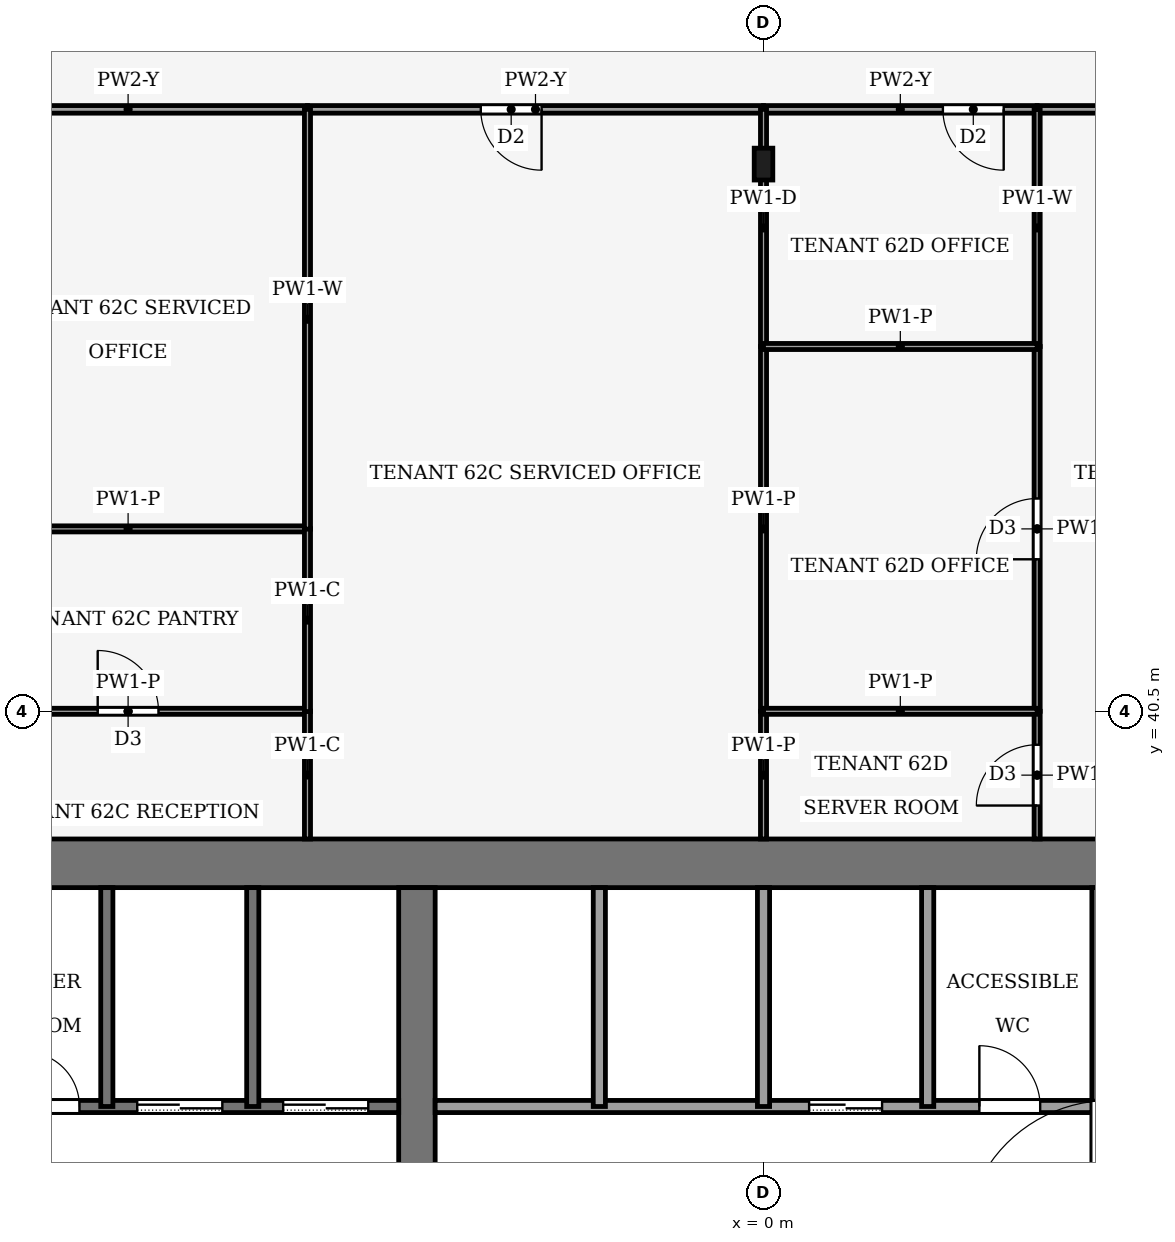
"""IFC4 building model, lengths in metres.
Left out: names, types, materials, properties, quantities, classifications, styles, units other than length and angle.
Written with IfcOpenShell. Run it as: python <this file> out.ifc"""

import sys

from ifc_helpers import new_model, si_unit, direction, frame, frame_2d, origin, origin_2d, place, context, subcontext, project, spatial, rectangle, i_section, extrude, element, fill, save


model = new_model("IFC4")
c1 = context("Model", 3, precision=1e-05, world=origin(), true_north=direction((0.0, 1.0)))
c2 = subcontext(c1, "Body", "Model", "MODEL_VIEW")
j1 = project(units=[si_unit("LENGTHUNIT", "METRE"), si_unit("PLANEANGLEUNIT", "RADIAN")], contexts=[c1])
p1 = place(None, origin())
s1 = spatial("IfcSite", under=j1, at=p1, CompositionType="ELEMENT")
p2 = place(p1, origin())
s2 = spatial("IfcBuilding", under=s1, at=p2, CompositionType="ELEMENT")
p3 = place(p2, frame((0.0, 0.0, 270.0)))
s3 = spatial("IfcBuildingStorey", under=s2, at=p3, CompositionType="ELEMENT", Elevation=270.0)
p4 = place(p3, frame((-13.4, 38.0, -0.13), z_axis=(0.0, 0.0, 1.0), x_axis=(1.0, 0.0, 0.0)))
e1 = element("IfcWall", 1, at=p4, inside=s3, PredefinedType="SHEAR", context=c2, shape_type="SweptSolid", body=[
    extrude(rectangle(XDim=26.8, YDim=0.8, at=frame_2d((13.4, 0.0))), origin(), (0.0, 0.0, 1.0), 4.0),
])
p5 = place(p3, frame((-5.7, 18.4, -0.13), z_axis=(0.0, 0.0, 1.0), x_axis=(0.0, 1.0, 0.0)))
e2 = element("IfcWall", 2, at=p5, inside=s3, PredefinedType="SHEAR", context=c2, shape_type="SweptSolid", body=[
    extrude(rectangle(XDim=19.2, YDim=0.6, at=frame_2d((9.6, 0.0))), origin(), (0.0, 0.0, 1.0), 4.0),
])
p6 = place(p5, frame((8.35, 0.0, 0.13)))
e3 = element("IfcOpeningElement", 3, at=p6, cuts=e2, PredefinedType="OPENING", context=c2, shape_type="SweptSolid", body=[
    extrude(rectangle(XDim=0.9, YDim=2.1, at=frame_2d((0.45, 1.05))), frame((0.0, 0.31, 0.0), z_axis=(0.0, -1.0, 0.0), x_axis=(1.0, 0.0, 0.0)), (0.0, 0.0, 1.0), 0.62),
])
p7 = place(p3, frame((5.7, 18.4, -0.13), z_axis=(0.0, 0.0, 1.0), x_axis=(0.0, 1.0, 0.0)))
e4 = element("IfcWall", 4, at=p7, inside=s3, PredefinedType="SHEAR", context=c2, shape_type="SweptSolid", body=[
    extrude(rectangle(XDim=19.2, YDim=0.6, at=frame_2d((9.6, 0.0))), origin(), (0.0, 0.0, 1.0), 4.0),
])
p8 = place(p7, frame((13.3, 0.0, 0.13)))
e5 = element("IfcOpeningElement", 5, at=p8, cuts=e4, PredefinedType="OPENING", context=c2, shape_type="SweptSolid", body=[
    extrude(rectangle(XDim=2.4, YDim=2.4, at=frame_2d((1.2, 1.2))), frame((0.0, 0.31, 0.0), z_axis=(0.0, -1.0, 0.0), x_axis=(1.0, 0.0, 0.0)), (0.0, 0.0, 1.0), 0.62),
])
p9 = place(p3, frame((0.0, 49.5, 0.0), z_axis=(0.0, 0.0, 1.0), x_axis=(1.0, 0.0, 0.0)))
e6 = element("IfcColumn", 6, at=p9, inside=s3, PredefinedType="COLUMN", context=c2, shape_type="SweptSolid", body=[
    extrude(i_section(OverallWidth=0.306, OverallDepth=0.524, WebThickness=0.012, FlangeThickness=0.04, FilletRadius=0.027, at=origin_2d()), origin(), (0.0, 0.0, 1.0), 4.0),
])
p10 = place(p3, frame((-12.6, 34.0, 0.0), z_axis=(0.0, 0.0, 1.0), x_axis=(1.0, 0.0, 0.0)))
e7 = element("IfcWall", 7, at=p10, inside=s3, PredefinedType="PARTITIONING", context=c2, shape_type="SweptSolid", body=[
    extrude(rectangle(XDim=6.6, YDim=0.2, at=frame_2d((3.3, 0.0))), origin(), (0.0, 0.0, 1.0), 3.87),
])
p11 = place(p10, frame((4.7, 0.0, 0.0)))
e8 = element("IfcOpeningElement", 8, at=p11, cuts=e7, PredefinedType="OPENING", context=c2, shape_type="SweptSolid", body=[
    extrude(rectangle(XDim=1.4, YDim=2.2, at=frame_2d((0.7, 1.1))), frame((0.0, 0.11, 0.0), z_axis=(0.0, -1.0, 0.0), x_axis=(1.0, 0.0, 0.0)), (0.0, 0.0, 1.0), 0.22),
])
p12 = place(p10, frame((2.3, 0.0, 0.0)))
e9 = element("IfcOpeningElement", 9, at=p12, cuts=e7, PredefinedType="OPENING", context=c2, shape_type="SweptSolid", body=[
    extrude(rectangle(XDim=1.4, YDim=2.2, at=frame_2d((0.7, 1.1))), frame((0.0, 0.11, 0.0), z_axis=(0.0, -1.0, 0.0), x_axis=(1.0, 0.0, 0.0)), (0.0, 0.0, 1.0), 0.22),
])
p13 = place(p10, frame((0.45, 0.0, 0.0)))
e10 = element("IfcOpeningElement", 10, at=p13, cuts=e7, PredefinedType="OPENING", context=c2, shape_type="SweptSolid", body=[
    extrude(rectangle(XDim=0.9, YDim=2.1, at=frame_2d((0.45, 1.05))), frame((0.0, 0.11, 0.0), z_axis=(0.0, -1.0, 0.0), x_axis=(1.0, 0.0, 0.0)), (0.0, 0.0, 1.0), 0.22),
])
p14 = place(p3, frame((-5.4, 34.0, 0.0), z_axis=(0.0, 0.0, 1.0), x_axis=(1.0, 0.0, 0.0)))
e11 = element("IfcWall", 11, at=p14, inside=s3, PredefinedType="PARTITIONING", context=c2, shape_type="SweptSolid", body=[
    extrude(rectangle(XDim=10.8, YDim=0.2, at=frame_2d((5.4, 0.0))), origin(), (0.0, 0.0, 1.0), 3.87),
])
p15 = place(p14, frame((6.15, 0.0, 0.0)))
e12 = element("IfcOpeningElement", 12, at=p15, cuts=e11, PredefinedType="OPENING", context=c2, shape_type="SweptSolid", body=[
    extrude(rectangle(XDim=1.2, YDim=2.2, at=frame_2d((0.6, 1.1))), frame((0.0, 0.11, 0.0), z_axis=(0.0, -1.0, 0.0), x_axis=(1.0, 0.0, 0.0)), (0.0, 0.0, 1.0), 0.22),
])
p16 = place(p14, frame((8.95, 0.0, 0.0)))
e13 = element("IfcOpeningElement", 13, at=p16, cuts=e11, PredefinedType="OPENING", context=c2, shape_type="SweptSolid", body=[
    extrude(rectangle(XDim=1.0, YDim=2.1, at=frame_2d((0.5, 1.05))), frame((0.0, 0.11, 0.0), z_axis=(0.0, -1.0, 0.0), x_axis=(1.0, 0.0, 0.0)), (0.0, 0.0, 1.0), 0.22),
])
for number, where, z_axis, x_axis in (
    (14, (-10.8, 34.0, 0.0), (0.0, 0.0, 1.0), (0.0, 1.0, 0.0)),
    (15, (-8.4, 34.0, 0.0), (0.0, 0.0, 1.0), (0.0, 1.0, 0.0)),
    (16, (-2.7, 34.0, 0.0), (0.0, 0.0, 1.0), (0.0, 1.0, 0.0)),
    (17, (0.0, 34.0, 0.0), (0.0, 0.0, 1.0), (0.0, 1.0, 0.0)),
    (18, (2.7, 34.0, 0.0), (0.0, 0.0, 1.0), (0.0, 1.0, 0.0)),
):
    element("IfcWall", number, at=place(p3, frame(where, z_axis=z_axis, x_axis=x_axis)), inside=s3, PredefinedType="PARTITIONING", context=c2, shape_type="SweptSolid", body=[
        extrude(rectangle(XDim=3.6, YDim=0.2, at=frame_2d((1.8, 0.0))), origin(), (0.0, 0.0, 1.0), 3.87),
    ])
p17 = place(p3, frame((-7.5, 50.4, 0.0), z_axis=(0.0, 0.0, 1.0), x_axis=(-1.0, 0.0, 0.0)))
e19 = element("IfcWall", 19, at=p17, inside=s3, PredefinedType="PARTITIONING", context=c2, shape_type="SweptSolid", body=[
    extrude(rectangle(XDim=5.9, YDim=0.125, at=frame_2d((2.95, 0.0))), origin(), (0.0, 0.0, 1.0), 3.24),
])
p18 = place(p3, frame((0.0, 50.4, 0.0), z_axis=(0.0, 0.0, 1.0), x_axis=(-1.0, 0.0, 0.0)))
e20 = element("IfcWall", 20, at=p18, inside=s3, PredefinedType="PARTITIONING", context=c2, shape_type="SweptSolid", body=[
    extrude(rectangle(XDim=7.5, YDim=0.125, at=frame_2d((3.75, 0.0))), origin(), (0.0, 0.0, 1.0), 3.24),
])
p19 = place(p18, frame((3.65, 0.0, 0.0)))
e21 = element("IfcOpeningElement", 21, at=p19, cuts=e20, PredefinedType="OPENING", context=c2, shape_type="SweptSolid", body=[
    extrude(rectangle(XDim=1.0, YDim=2.1, at=frame_2d((0.5, 1.05))), frame((0.0, 0.073, 0.0), z_axis=(0.0, -1.0, 0.0), x_axis=(1.0, 0.0, 0.0)), (0.0, 0.0, 1.0), 0.145),
])
p20 = place(p3, frame((10.4, 50.4, 0.0), z_axis=(0.0, 0.0, 1.0), x_axis=(-1.0, 0.0, 0.0)))
e22 = element("IfcWall", 22, at=p20, inside=s3, PredefinedType="PARTITIONING", context=c2, shape_type="SweptSolid", body=[
    extrude(rectangle(XDim=5.9, YDim=0.125, at=frame_2d((2.95, 0.0))), origin(), (0.0, 0.0, 1.0), 3.24),
])
p21 = place(p20, frame((2.45, 0.0, 0.0)))
e23 = element("IfcOpeningElement", 23, at=p21, cuts=e22, PredefinedType="OPENING", context=c2, shape_type="SweptSolid", body=[
    extrude(rectangle(XDim=1.0, YDim=2.1, at=frame_2d((0.5, 1.05))), frame((0.0, 0.073, 0.0), z_axis=(0.0, -1.0, 0.0), x_axis=(1.0, 0.0, 0.0)), (0.0, 0.0, 1.0), 0.145),
])
p22 = place(p3, frame((4.5, 50.4, 0.0), z_axis=(0.0, 0.0, 1.0), x_axis=(-1.0, 0.0, 0.0)))
e24 = element("IfcWall", 24, at=p22, inside=s3, PredefinedType="PARTITIONING", context=c2, shape_type="SweptSolid", body=[
    extrude(rectangle(XDim=4.5, YDim=0.125, at=frame_2d((2.25, 0.0))), origin(), (0.0, 0.0, 1.0), 3.24),
])
p23 = place(p22, frame((0.55, 0.0, 0.0)))
e25 = element("IfcOpeningElement", 25, at=p23, cuts=e24, PredefinedType="OPENING", context=c2, shape_type="SweptSolid", body=[
    extrude(rectangle(XDim=1.0, YDim=2.1, at=frame_2d((0.5, 1.05))), frame((0.0, 0.073, 0.0), z_axis=(0.0, -1.0, 0.0), x_axis=(1.0, 0.0, 0.0)), (0.0, 0.0, 1.0), 0.145),
])
p24 = place(p3, frame((-13.4, 40.5, 0.0), z_axis=(0.0, 0.0, 1.0), x_axis=(1.0, 0.0, 0.0)))
e26 = element("IfcWall", 26, at=p24, inside=s3, PredefinedType="PARTITIONING", context=c2, shape_type="SweptSolid", body=[
    extrude(rectangle(XDim=5.9, YDim=0.1, at=frame_2d((2.95, 0.0))), origin(), (0.0, 0.0, 1.0), 3.44),
])
p25 = place(p24, frame((2.45, 0.0, 0.0)))
e27 = element("IfcOpeningElement", 27, at=p25, cuts=e26, PredefinedType="OPENING", context=c2, shape_type="SweptSolid", body=[
    extrude(rectangle(XDim=1.0, YDim=2.1, at=frame_2d((0.5, 1.05))), frame((0.0, 0.06, 0.0), z_axis=(0.0, -1.0, 0.0), x_axis=(1.0, 0.0, 0.0)), (0.0, 0.0, 1.0), 0.12),
])
p26 = place(p3, frame((-7.5, 38.4, 0.0), z_axis=(0.0, 0.0, 1.0), x_axis=(0.0, 1.0, 0.0)))
e28 = element("IfcWall", 28, at=p26, inside=s3, PredefinedType="PARTITIONING", context=c2, shape_type="SweptSolid", body=[
    extrude(rectangle(XDim=2.104, YDim=0.1, at=frame_2d((1.052, 0.0))), origin(), (0.0, 0.0, 1.0), 3.87),
])
p27 = place(p3, frame((-7.5, 43.5, 0.0), z_axis=(0.0, 0.0, 1.0), x_axis=(-1.0, 0.0, 0.0)))
e29 = element("IfcWall", 29, at=p27, inside=s3, PredefinedType="PARTITIONING", context=c2, shape_type="SweptSolid", body=[
    extrude(rectangle(XDim=5.9, YDim=0.1, at=frame_2d((2.95, 0.0))), origin(), (0.0, 0.0, 1.0), 3.44),
])
p28 = place(p3, frame((-7.5, 40.496, 0.0), z_axis=(0.0, 0.0, 1.0), x_axis=(0.0, 1.0, 0.0)))
e30 = element("IfcWall", 30, at=p28, inside=s3, PredefinedType="PARTITIONING", context=c2, shape_type="SweptSolid", body=[
    extrude(rectangle(XDim=3.008, YDim=0.1, at=frame_2d((1.504, 0.0))), origin(), (0.0, 0.0, 1.0), 3.87),
])
p29 = place(p3, frame((-7.5, 43.496, 0.0), z_axis=(0.0, 0.0, 1.0), x_axis=(0.0, 1.0, 0.0)))
e31 = element("IfcWall", 31, at=p29, inside=s3, PredefinedType="PARTITIONING", context=c2, shape_type="SweptSolid", body=[
    extrude(rectangle(XDim=6.904, YDim=0.1, at=frame_2d((3.452, 0.0))), origin(), (0.0, 0.0, 1.0), 3.24),
])
p30 = place(p3, frame((0.0, 38.4, 0.0), z_axis=(0.0, 0.0, 1.0), x_axis=(0.0, 1.0, 0.0)))
e32 = element("IfcWall", 32, at=p30, inside=s3, PredefinedType="PARTITIONING", context=c2, shape_type="SweptSolid", body=[
    extrude(rectangle(XDim=2.1, YDim=0.1, at=frame_2d((1.05, 0.0))), origin(), (0.0, 0.0, 1.0), 3.44),
])
p31 = place(p3, frame((0.0, 40.5, 0.0), z_axis=(0.0, 0.0, 1.0), x_axis=(0.0, 1.0, 0.0)))
e33 = element("IfcWall", 33, at=p31, inside=s3, PredefinedType="PARTITIONING", context=c2, shape_type="SweptSolid", body=[
    extrude(rectangle(XDim=6.0, YDim=0.1, at=frame_2d((3.0, 0.0))), origin(), (0.0, 0.0, 1.0), 3.44),
])
p32 = place(p3, frame((0.0, 46.5, 0.0), z_axis=(0.0, 0.0, 1.0), x_axis=(0.0, 1.0, 0.0)))
e34 = element("IfcWall", 34, at=p32, inside=s3, PredefinedType="PARTITIONING", context=c2, shape_type="SweptSolid", body=[
    extrude(rectangle(XDim=3.9, YDim=0.1, at=frame_2d((1.95, 0.0))), origin(), (0.0, 0.0, 1.0), 3.29),
])
p33 = place(p3, frame((4.5, 38.4, 0.0), z_axis=(0.0, 0.0, 1.0), x_axis=(0.0, 1.0, 0.0)))
e35 = element("IfcWall", 35, at=p33, inside=s3, PredefinedType="PARTITIONING", context=c2, shape_type="SweptSolid", body=[
    extrude(rectangle(XDim=2.1, YDim=0.1, at=frame_2d((1.05, 0.0))), origin(), (0.0, 0.0, 1.0), 3.87),
])
p34 = place(p33, frame((0.55, 0.0, 0.0)))
e36 = element("IfcOpeningElement", 36, at=p34, cuts=e35, PredefinedType="OPENING", context=c2, shape_type="SweptSolid", body=[
    extrude(rectangle(XDim=1.0, YDim=2.1, at=frame_2d((0.5, 1.05))), frame((0.0, 0.06, 0.0), z_axis=(0.0, -1.0, 0.0), x_axis=(1.0, 0.0, 0.0)), (0.0, 0.0, 1.0), 0.12),
])
p35 = place(p3, frame((4.5, 40.5, 0.0), z_axis=(0.0, 0.0, 1.0), x_axis=(0.0, 1.0, 0.0)))
e37 = element("IfcWall", 37, at=p35, inside=s3, PredefinedType="PARTITIONING", context=c2, shape_type="SweptSolid", body=[
    extrude(rectangle(XDim=6.0, YDim=0.1, at=frame_2d((3.0, 0.0))), origin(), (0.0, 0.0, 1.0), 3.87),
])
p36 = place(p35, frame((2.5, 0.0, 0.0)))
e38 = element("IfcOpeningElement", 38, at=p36, cuts=e37, PredefinedType="OPENING", context=c2, shape_type="SweptSolid", body=[
    extrude(rectangle(XDim=1.0, YDim=2.1, at=frame_2d((0.5, 1.05))), frame((0.0, 0.06, 0.0), z_axis=(0.0, -1.0, 0.0), x_axis=(1.0, 0.0, 0.0)), (0.0, 0.0, 1.0), 0.12),
])
p37 = place(p3, frame((4.5, 50.4, 0.0), z_axis=(0.0, 0.0, 1.0), x_axis=(0.0, -1.0, 0.0)))
e39 = element("IfcWall", 39, at=p37, inside=s3, PredefinedType="PARTITIONING", context=c2, shape_type="SweptSolid", body=[
    extrude(rectangle(XDim=3.9, YDim=0.1, at=frame_2d((1.95, 0.0))), origin(), (0.0, 0.0, 1.0), 3.24),
])
for number, where, z_axis, x_axis in (
    (40, (4.5, 40.5, 0.0), (0.0, 0.0, 1.0), (-1.0, 0.0, 0.0)),
    (41, (4.5, 46.5, 0.0), (0.0, 0.0, 1.0), (-1.0, 0.0, 0.0)),
):
    element("IfcWall", number, at=place(p3, frame(where, z_axis=z_axis, x_axis=x_axis)), inside=s3, PredefinedType="PARTITIONING", context=c2, shape_type="SweptSolid", body=[
        extrude(rectangle(XDim=4.5, YDim=0.1, at=frame_2d((2.25, 0.0))), origin(), (0.0, 0.0, 1.0), 3.44),
    ])
p38 = place(p15, origin())
e42 = element("IfcDoor", 42, at=p38, inside=s3, OperationType="SLIDING_TO_LEFT", PredefinedType="DOOR", context=c2, shape_type="SweptSolid", body=[
    extrude(rectangle(XDim=1.2, YDim=2.2, at=frame_2d((0.6, 1.1))), frame((0.0, 0.025, 0.0), z_axis=(0.0, -1.0, 0.0), x_axis=(1.0, 0.0, 0.0)), (0.0, 0.0, 1.0), 0.05),
])
fill(e12, e42)
p39 = place(p11, origin())
e43 = element("IfcDoor", 43, at=p39, inside=s3, OperationType="SLIDING_TO_LEFT", PredefinedType="DOOR", context=c2, shape_type="SweptSolid", body=[
    extrude(rectangle(XDim=1.4, YDim=2.2, at=frame_2d((0.7, 1.1))), frame((0.0, 0.025, 0.0), z_axis=(0.0, -1.0, 0.0), x_axis=(1.0, 0.0, 0.0)), (0.0, 0.0, 1.0), 0.05),
])
fill(e8, e43)
p40 = place(p12, origin())
e44 = element("IfcDoor", 44, at=p40, inside=s3, OperationType="SLIDING_TO_LEFT", PredefinedType="DOOR", context=c2, shape_type="SweptSolid", body=[
    extrude(rectangle(XDim=1.4, YDim=2.2, at=frame_2d((0.7, 1.1))), frame((0.0, 0.025, 0.0), z_axis=(0.0, -1.0, 0.0), x_axis=(1.0, 0.0, 0.0)), (0.0, 0.0, 1.0), 0.05),
])
fill(e9, e44)
p41 = place(p13, origin())
e45 = element("IfcDoor", 45, at=p41, inside=s3, OperationType="SINGLE_SWING_RIGHT", PredefinedType="DOOR", context=c2, shape_type="SweptSolid", body=[
    extrude(rectangle(XDim=0.9, YDim=2.1, at=frame_2d((0.45, 1.05))), frame((0.0, 0.025, 0.0), z_axis=(0.0, -1.0, 0.0), x_axis=(1.0, 0.0, 0.0)), (0.0, 0.0, 1.0), 0.05),
])
fill(e10, e45)
p42 = place(p16, origin())
e46 = element("IfcDoor", 46, at=p42, inside=s3, OperationType="SINGLE_SWING_LEFT", PredefinedType="DOOR", context=c2, shape_type="SweptSolid", body=[
    extrude(rectangle(XDim=1.0, YDim=2.1, at=frame_2d((0.5, 1.05))), frame((0.0, 0.025, 0.0), z_axis=(0.0, -1.0, 0.0), x_axis=(1.0, 0.0, 0.0)), (0.0, 0.0, 1.0), 0.05),
])
fill(e13, e46)
p43 = place(p19, origin())
e47 = element("IfcDoor", 47, at=p43, inside=s3, OperationType="SINGLE_SWING_RIGHT", PredefinedType="DOOR", context=c2, shape_type="SweptSolid", body=[
    extrude(rectangle(XDim=1.0, YDim=2.1, at=frame_2d((0.5, 1.05))), frame((0.0, 0.025, 0.0), z_axis=(0.0, -1.0, 0.0), x_axis=(1.0, 0.0, 0.0)), (0.0, 0.0, 1.0), 0.05),
])
fill(e21, e47)
p44 = place(p23, origin())
e48 = element("IfcDoor", 48, at=p44, inside=s3, OperationType="SINGLE_SWING_LEFT", PredefinedType="DOOR", context=c2, shape_type="SweptSolid", body=[
    extrude(rectangle(XDim=1.0, YDim=2.1, at=frame_2d((0.5, 1.05))), frame((0.0, 0.025, 0.0), z_axis=(0.0, -1.0, 0.0), x_axis=(1.0, 0.0, 0.0)), (0.0, 0.0, 1.0), 0.05),
])
fill(e25, e48)
p45 = place(p25, origin())
e49 = element("IfcDoor", 49, at=p45, inside=s3, OperationType="SINGLE_SWING_LEFT", PredefinedType="DOOR", context=c2, shape_type="SweptSolid", body=[
    extrude(rectangle(XDim=1.0, YDim=2.1, at=frame_2d((0.5, 1.05))), frame((0.0, 0.025, 0.0), z_axis=(0.0, -1.0, 0.0), x_axis=(1.0, 0.0, 0.0)), (0.0, 0.0, 1.0), 0.05),
])
fill(e27, e49)
p46 = place(p34, origin())
e50 = element("IfcDoor", 50, at=p46, inside=s3, OperationType="SINGLE_SWING_RIGHT", PredefinedType="DOOR", context=c2, shape_type="SweptSolid", body=[
    extrude(rectangle(XDim=1.0, YDim=2.1, at=frame_2d((0.5, 1.05))), frame((0.0, 0.025, 0.0), z_axis=(0.0, -1.0, 0.0), x_axis=(1.0, 0.0, 0.0)), (0.0, 0.0, 1.0), 0.05),
])
fill(e36, e50)
p47 = place(p36, origin())
e51 = element("IfcDoor", 51, at=p47, inside=s3, OperationType="SINGLE_SWING_LEFT", PredefinedType="DOOR", context=c2, shape_type="SweptSolid", body=[
    extrude(rectangle(XDim=1.0, YDim=2.1, at=frame_2d((0.5, 1.05))), frame((0.0, 0.025, 0.0), z_axis=(0.0, -1.0, 0.0), x_axis=(1.0, 0.0, 0.0)), (0.0, 0.0, 1.0), 0.05),
])
fill(e38, e51)
save(model, sys.argv[1])
